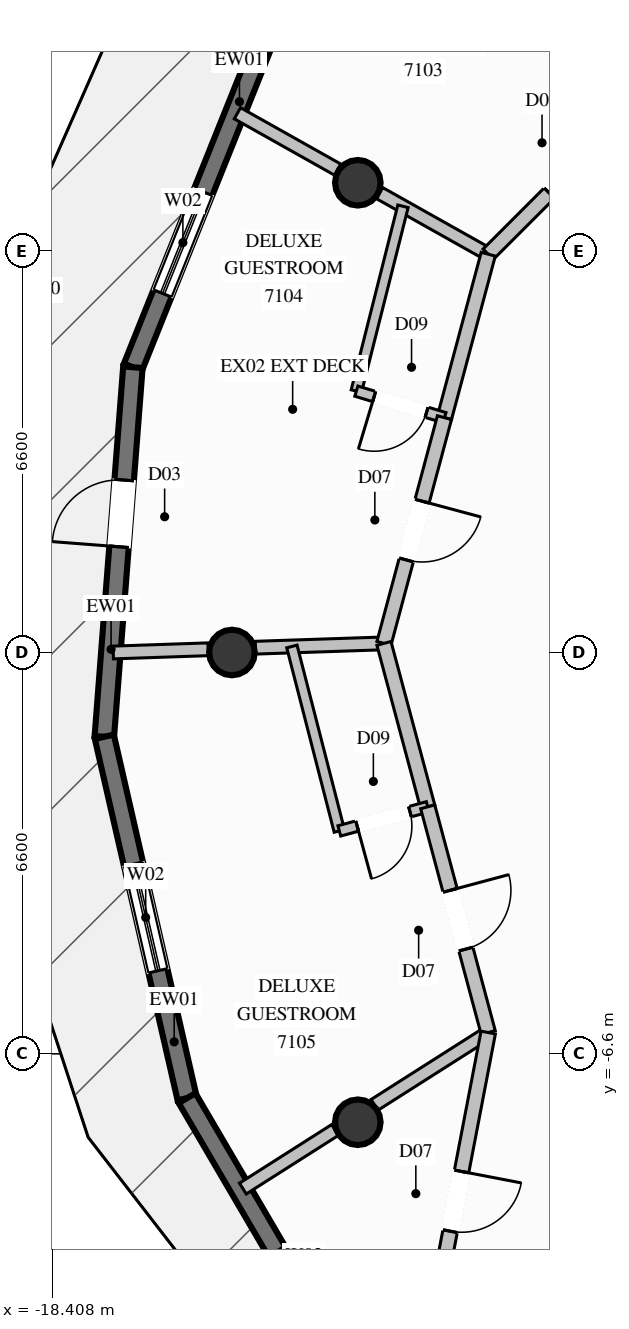
"""IFC4 building model, lengths in metres.
Left out: names, types, materials, properties, quantities, classifications, styles, units other than length and angle.
Written with IfcOpenShell. Run it as: python <this file> out.ifc"""

import sys

from ifc_helpers import new_model, si_unit, direction, frame, frame_2d, origin, origin_2d, place, context, subcontext, project, spatial, rectangle, circle, extrude, element, fill, save


model = new_model("IFC4")
c1 = context("Model", 3, precision=1e-05, world=origin(), true_north=direction((0.0, 1.0)))
c2 = subcontext(c1, "Body", "Model", "MODEL_VIEW")
j1 = project(units=[si_unit("LENGTHUNIT", "METRE"), si_unit("PLANEANGLEUNIT", "RADIAN")], contexts=[c1])
p1 = place(None, origin())
s1 = spatial("IfcSite", under=j1, at=p1, CompositionType="ELEMENT")
p2 = place(p1, origin())
s2 = spatial("IfcBuilding", under=s1, at=p2, CompositionType="ELEMENT")
p3 = place(p2, frame((0.0, 0.0, 266.8)))
s3 = spatial("IfcBuildingStorey", under=s2, at=p3, CompositionType="ELEMENT", Elevation=266.8)
for number, where, z_axis, x_axis in (
    (1, (-13.38, 7.725, 0.0), (0.0, 0.0, 1.0), (1.0, 0.0, 0.0)),
    (2, (-15.45, 0.0, 0.0), (0.0, 0.0, 1.0), (1.0, 0.0, 0.0)),
    (3, (-13.38, -7.725, 0.0), (0.0, 0.0, 1.0), (1.0, 0.0, 0.0)),
):
    element("IfcColumn", number, at=place(p3, frame(where, z_axis=z_axis, x_axis=x_axis)), inside=s3, PredefinedType="COLUMN", context=c2, shape_type="SweptSolid", body=[
        extrude(circle(Radius=0.375, at=origin_2d()), origin(), (0.0, 0.0, 1.0), 3.8),
    ])
p4 = place(p3, frame((-17.079, 4.691, 0.0), z_axis=(0.0, 0.0, 1.0), x_axis=(0.372370916096, 0.928083994499, 0.0)))
e4 = element("IfcWall", 4, at=p4, inside=s3, PredefinedType="SOLIDWALL", context=c2, shape_type="SweptSolid", body=[
    extrude(rectangle(XDim=6.053, YDim=0.32, at=frame_2d((3.027, 0.0))), origin(), (0.0, 0.0, 1.0), 3.57),
])
p5 = place(p4, frame((1.308, 0.0, 0.35)))
e5 = element("IfcOpeningElement", 5, at=p5, cuts=e4, PredefinedType="OPENING", context=c2, shape_type="SweptSolid", body=[
    extrude(rectangle(XDim=1.8, YDim=2.6, at=frame_2d((0.9, 1.3))), frame((0.0, 0.17, 0.0), z_axis=(0.0, -1.0, 0.0), x_axis=(1.0, 0.0, 0.0)), (0.0, 0.0, 1.0), 0.34),
])
p6 = place(p3, frame((-17.549, -1.386, 0.0), z_axis=(0.0, 0.0, 1.0), x_axis=(0.077106944018, 0.997022827815, 0.0)))
e6 = element("IfcWall", 6, at=p6, inside=s3, PredefinedType="SOLIDWALL", context=c2, shape_type="SweptSolid", body=[
    extrude(rectangle(XDim=6.095, YDim=0.32, at=frame_2d((3.047, 0.0))), origin(), (0.0, 0.0, 1.0), 3.57),
])
p7 = place(p6, frame((3.134, 0.0, 0.0)))
e7 = element("IfcOpeningElement", 7, at=p7, cuts=e6, PredefinedType="OPENING", context=c2, shape_type="SweptSolid", body=[
    extrude(rectangle(XDim=1.1, YDim=2.2, at=frame_2d((0.55, 1.1))), frame((0.0, 0.17, 0.0), z_axis=(0.0, -1.0, 0.0), x_axis=(1.0, 0.0, 0.0)), (0.0, 0.0, 1.0), 0.34),
])
p8 = place(p3, frame((-16.188, -7.328, 0.0), z_axis=(0.0, 0.0, 1.0), x_axis=(-0.223282610096, 0.974753751482, 0.0)))
e8 = element("IfcWall", 8, at=p8, inside=s3, PredefinedType="SOLIDWALL", context=c2, shape_type="SweptSolid", body=[
    extrude(rectangle(XDim=6.096, YDim=0.32, at=frame_2d((3.048, 0.0))), origin(), (0.0, 0.0, 1.0), 3.57),
])
p9 = place(p8, frame((2.148, 0.0, 0.35)))
e9 = element("IfcOpeningElement", 9, at=p9, cuts=e8, PredefinedType="OPENING", context=c2, shape_type="SweptSolid", body=[
    extrude(rectangle(XDim=1.8, YDim=2.6, at=frame_2d((0.9, 1.3))), frame((0.0, 0.17, 0.0), z_axis=(0.0, -1.0, 0.0), x_axis=(1.0, 0.0, 0.0)), (0.0, 0.0, 1.0), 0.34),
])
p10 = place(p3, frame((-13.13, -12.552, 0.0), z_axis=(0.0, 0.0, 1.0), x_axis=(-0.505189458577, 0.863008465163, 0.0)))
e10 = element("IfcWall", 10, at=p10, inside=s3, PredefinedType="SOLIDWALL", context=c2, shape_type="SweptSolid", body=[
    extrude(rectangle(XDim=6.053, YDim=0.32, at=frame_2d((3.027, 0.0))), origin(), (0.0, 0.0, 1.0), 3.57),
])
p11 = place(p10, frame((1.34, 0.0, 0.35)))
e11 = element("IfcOpeningElement", 11, at=p11, cuts=e10, PredefinedType="OPENING", context=c2, shape_type="SweptSolid", body=[
    extrude(rectangle(XDim=1.8, YDim=2.6, at=frame_2d((0.9, 1.3))), frame((0.0, 0.17, 0.0), z_axis=(0.0, -1.0, 0.0), x_axis=(1.0, 0.0, 0.0)), (0.0, 0.0, 1.0), 0.34),
])
p12 = place(p3, frame((-11.235, 6.55, 0.0), z_axis=(0.0, 0.0, 1.0), x_axis=(-0.871737625494, 0.489972970987, 0.0)))
e12 = element("IfcWall", 12, at=p12, inside=s3, PredefinedType="PARTITIONING", context=c2, shape_type="SweptSolid", body=[
    extrude(rectangle(XDim=2.051, YDim=0.21, at=frame_2d((1.025, 0.0))), origin(), (0.0, 0.0, 1.0), 3.085),
])
p13 = place(p3, frame((-13.711, 7.941, 0.0), z_axis=(0.0, 0.0, 1.0), x_axis=(-0.87172369265, 0.489997758844, 0.0)))
e13 = element("IfcWall", 13, at=p13, inside=s3, PredefinedType="PARTITIONING", context=c2, shape_type="SweptSolid", body=[
    extrude(rectangle(XDim=1.892, YDim=0.21, at=frame_2d((0.946, 0.0))), origin(), (0.0, 0.0, 1.0), 3.57),
])
p14 = place(p3, frame((-12.95, 0.15, 0.0), z_axis=(0.0, 0.0, 1.0), x_axis=(-0.999439124644, -0.033487850508, 0.0)))
e14 = element("IfcWall", 14, at=p14, inside=s3, PredefinedType="PARTITIONING", context=c2, shape_type="SweptSolid", body=[
    extrude(rectangle(XDim=2.114, YDim=0.21, at=frame_2d((1.057, 0.0))), origin(), (0.0, 0.0, 1.0), 3.57),
])
p15 = place(p3, frame((-15.841, 0.053, 0.0), z_axis=(0.0, 0.0, 1.0), x_axis=(-0.999424600814, -0.033918539002, 0.0)))
e15 = element("IfcWall", 15, at=p15, inside=s3, PredefinedType="PARTITIONING", context=c2, shape_type="SweptSolid", body=[
    extrude(rectangle(XDim=1.562, YDim=0.21, at=frame_2d((0.781, 0.0))), origin(), (0.0, 0.0, 1.0), 3.57),
])
p16 = place(p3, frame((-11.235, -6.25, 0.0), z_axis=(0.0, 0.0, 1.0), x_axis=(-0.843783883801, -0.536683107092, 0.0)))
e16 = element("IfcWall", 16, at=p16, inside=s3, PredefinedType="PARTITIONING", context=c2, shape_type="SweptSolid", body=[
    extrude(rectangle(XDim=2.217, YDim=0.21, at=frame_2d((1.109, 0.0))), origin(), (0.0, 0.0, 1.0), 3.085),
])
p17 = place(p3, frame((-13.754, -7.852, 0.0), z_axis=(0.0, 0.0, 1.0), x_axis=(-0.843896422102, -0.536506131152, 0.0)))
e17 = element("IfcWall", 17, at=p17, inside=s3, PredefinedType="PARTITIONING", context=c2, shape_type="SweptSolid", body=[
    extrude(rectangle(XDim=1.797, YDim=0.21, at=frame_2d((0.898, 0.0))), origin(), (0.0, 0.0, 1.0), 3.57),
])
p18 = place(p3, frame((-8.518, 9.267, 0.0), z_axis=(0.0, 0.0, 1.0), x_axis=(-0.707106781187, -0.707106781187, 0.0)))
e18 = element("IfcWall", 18, at=p18, inside=s3, PredefinedType="PARTITIONING", context=c2, shape_type="SweptSolid", body=[
    extrude(rectangle(XDim=3.843, YDim=0.24, at=frame_2d((1.921, 0.0))), origin(), (0.0, 0.0, 1.0), 3.57),
])
p19 = place(p18, frame((1.421, 0.0, 0.0)))
e19 = element("IfcOpeningElement", 19, at=p19, cuts=e18, PredefinedType="OPENING", context=c2, shape_type="SweptSolid", body=[
    extrude(rectangle(XDim=1.0, YDim=2.2, at=frame_2d((0.5, 1.1))), frame((0.0, 0.13, 0.0), z_axis=(0.0, -1.0, 0.0), x_axis=(1.0, 0.0, 0.0)), (0.0, 0.0, 1.0), 0.26),
])
p20 = place(p3, frame((-11.235, 6.55, 0.0), z_axis=(0.0, 0.0, 1.0), x_axis=(-0.258727314432, -0.96595040078, 0.0)))
e20 = element("IfcWall", 20, at=p20, inside=s3, PredefinedType="PARTITIONING", context=c2, shape_type="SweptSolid", body=[
    extrude(rectangle(XDim=2.783, YDim=0.24, at=frame_2d((1.391, 0.0))), origin(), (0.0, 0.0, 1.0), 3.57),
])
p21 = place(p3, frame((-12.637, 7.338, 0.0), z_axis=(0.0, 0.0, 1.0), x_axis=(-0.244678847227, -0.969604177858, 0.0)))
e21 = element("IfcWall", 21, at=p21, inside=s3, PredefinedType="PLUMBINGWALL", context=c2, shape_type="SweptSolid", body=[
    extrude(rectangle(XDim=3.135, YDim=0.175, at=frame_2d((1.567, 0.0))), origin(), (0.0, 0.0, 1.0), 3.57),
])
p22 = place(p3, frame((-11.955, 3.862, 0.0), z_axis=(0.0, 0.0, 1.0), x_axis=(-0.957581701608, 0.288161907173, 0.0)))
e22 = element("IfcWall", 22, at=p22, inside=s3, PredefinedType="PLUMBINGWALL", context=c2, shape_type="SweptSolid", body=[
    extrude(rectangle(XDim=1.513, YDim=0.175, at=frame_2d((0.757, 0.0))), origin(), (0.0, 0.0, 1.0), 3.57),
])
p23 = place(p22, frame((0.307, 0.0, 0.0)))
e23 = element("IfcOpeningElement", 23, at=p23, cuts=e22, PredefinedType="OPENING", context=c2, shape_type="SweptSolid", body=[
    extrude(rectangle(XDim=0.9, YDim=2.1, at=frame_2d((0.45, 1.05))), frame((0.0, 0.098, 0.0), z_axis=(0.0, -1.0, 0.0), x_axis=(1.0, 0.0, 0.0)), (0.0, 0.0, 1.0), 0.195),
])
p24 = place(p3, frame((-11.955, 3.862, 0.0), z_axis=(0.0, 0.0, 1.0), x_axis=(-0.258868389222, -0.965912603221, 0.0)))
e24 = element("IfcWall", 24, at=p24, inside=s3, PredefinedType="PARTITIONING", context=c2, shape_type="SweptSolid", body=[
    extrude(rectangle(XDim=3.843, YDim=0.24, at=frame_2d((1.922, 0.0))), origin(), (0.0, 0.0, 1.0), 3.57),
])
p25 = place(p24, frame((1.422, 0.0, 0.0)))
e25 = element("IfcOpeningElement", 25, at=p25, cuts=e24, PredefinedType="OPENING", context=c2, shape_type="SweptSolid", body=[
    extrude(rectangle(XDim=1.0, YDim=2.2, at=frame_2d((0.5, 1.1))), frame((0.0, 0.13, 0.0), z_axis=(0.0, -1.0, 0.0), x_axis=(1.0, 0.0, 0.0)), (0.0, 0.0, 1.0), 0.26),
])
p26 = place(p3, frame((-12.95, 0.15, 0.0), z_axis=(0.0, 0.0, 1.0), x_axis=(0.258727314432, -0.96595040078, 0.0)))
e26 = element("IfcWall", 26, at=p26, inside=s3, PredefinedType="PARTITIONING", context=c2, shape_type="SweptSolid", body=[
    extrude(rectangle(XDim=2.783, YDim=0.24, at=frame_2d((1.391, 0.0))), origin(), (0.0, 0.0, 1.0), 3.57),
])
p27 = place(p3, frame((-14.464, 0.099, 0.0), z_axis=(0.0, 0.0, 1.0), x_axis=(0.249059841598, -0.968488097657, 0.0)))
e27 = element("IfcWall", 27, at=p27, inside=s3, PredefinedType="PLUMBINGWALL", context=c2, shape_type="SweptSolid", body=[
    extrude(rectangle(XDim=3.132, YDim=0.175, at=frame_2d((1.566, 0.0))), origin(), (0.0, 0.0, 1.0), 3.57),
])
p28 = place(p3, frame((-12.23, -2.538, 0.0), z_axis=(0.0, 0.0, 1.0), x_axis=(-0.964860954296, -0.262760991919, 0.0)))
e28 = element("IfcWall", 28, at=p28, inside=s3, PredefinedType="PLUMBINGWALL", context=c2, shape_type="SweptSolid", body=[
    extrude(rectangle(XDim=1.507, YDim=0.175, at=frame_2d((0.753, 0.0))), origin(), (0.0, 0.0, 1.0), 3.57),
])
p29 = place(p28, frame((0.303, 0.0, 0.0)))
e29 = element("IfcOpeningElement", 29, at=p29, cuts=e28, PredefinedType="OPENING", context=c2, shape_type="SweptSolid", body=[
    extrude(rectangle(XDim=0.9, YDim=2.1, at=frame_2d((0.45, 1.05))), frame((0.0, 0.098, 0.0), z_axis=(0.0, -1.0, 0.0), x_axis=(1.0, 0.0, 0.0)), (0.0, 0.0, 1.0), 0.195),
])
p30 = place(p3, frame((-12.23, -2.538, 0.0), z_axis=(0.0, 0.0, 1.0), x_axis=(0.258884274469, -0.965908345772, 0.0)))
e30 = element("IfcWall", 30, at=p30, inside=s3, PredefinedType="PARTITIONING", context=c2, shape_type="SweptSolid", body=[
    extrude(rectangle(XDim=3.843, YDim=0.24, at=frame_2d((1.921, 0.0))), origin(), (0.0, 0.0, 1.0), 3.57),
])
p31 = place(p30, frame((1.422, 0.0, 0.0)))
e31 = element("IfcOpeningElement", 31, at=p31, cuts=e30, PredefinedType="OPENING", context=c2, shape_type="SweptSolid", body=[
    extrude(rectangle(XDim=1.0, YDim=2.2, at=frame_2d((0.5, 1.1))), frame((0.0, 0.13, 0.0), z_axis=(0.0, -1.0, 0.0), x_axis=(1.0, 0.0, 0.0)), (0.0, 0.0, 1.0), 0.26),
])
p32 = place(p3, frame((-11.235, -6.25, 0.0), z_axis=(0.0, 0.0, 1.0), x_axis=(-0.18844199237, -0.982084321997, 0.0)))
e32 = element("IfcWall", 32, at=p32, inside=s3, PredefinedType="PARTITIONING", context=c2, shape_type="SweptSolid", body=[
    extrude(rectangle(XDim=5.651, YDim=0.24, at=frame_2d((2.826, 0.0))), origin(), (0.0, 0.0, 1.0), 3.57),
])
p33 = place(p32, frame((2.326, 0.0, 0.0)))
e33 = element("IfcOpeningElement", 33, at=p33, cuts=e32, PredefinedType="OPENING", context=c2, shape_type="SweptSolid", body=[
    extrude(rectangle(XDim=1.0, YDim=2.2, at=frame_2d((0.5, 1.1))), frame((0.0, 0.13, 0.0), z_axis=(0.0, -1.0, 0.0), x_axis=(1.0, 0.0, 0.0)), (0.0, 0.0, 1.0), 0.26),
])
p34 = place(p5, origin())
e34 = element("IfcWindow", 34, at=p34, inside=s3, PartitioningType="SINGLE_PANEL", PredefinedType="WINDOW", context=c2, shape_type="SweptSolid", body=[
    extrude(rectangle(XDim=1.8, YDim=2.6, at=frame_2d((0.9, 1.3))), frame((0.0, 0.03, 0.0), z_axis=(0.0, -1.0, 0.0), x_axis=(1.0, 0.0, 0.0)), (0.0, 0.0, 1.0), 0.06),
])
fill(e5, e34)
p35 = place(p7, origin())
e35 = element("IfcDoor", 35, at=p35, inside=s3, OperationType="SINGLE_SWING_LEFT", PredefinedType="DOOR", context=c2, shape_type="SweptSolid", body=[
    extrude(rectangle(XDim=1.1, YDim=2.2, at=frame_2d((0.55, 1.1))), frame((0.0, 0.025, 0.0), z_axis=(0.0, -1.0, 0.0), x_axis=(1.0, 0.0, 0.0)), (0.0, 0.0, 1.0), 0.05),
])
fill(e7, e35)
p36 = place(p9, origin())
e36 = element("IfcWindow", 36, at=p36, inside=s3, PartitioningType="SINGLE_PANEL", PredefinedType="WINDOW", context=c2, shape_type="SweptSolid", body=[
    extrude(rectangle(XDim=1.8, YDim=2.6, at=frame_2d((0.9, 1.3))), frame((0.0, 0.03, 0.0), z_axis=(0.0, -1.0, 0.0), x_axis=(1.0, 0.0, 0.0)), (0.0, 0.0, 1.0), 0.06),
])
fill(e9, e36)
p37 = place(p19, origin())
e37 = element("IfcDoor", 37, at=p37, inside=s3, OperationType="SINGLE_SWING_LEFT", PredefinedType="DOOR", context=c2, shape_type="SweptSolid", body=[
    extrude(rectangle(XDim=1.0, YDim=2.2, at=frame_2d((0.5, 1.1))), frame((0.0, 0.025, 0.0), z_axis=(0.0, -1.0, 0.0), x_axis=(1.0, 0.0, 0.0)), (0.0, 0.0, 1.0), 0.05),
])
fill(e19, e37)
p38 = place(p23, origin())
e38 = element("IfcDoor", 38, at=p38, inside=s3, OperationType="SINGLE_SWING_RIGHT", PredefinedType="DOOR", context=c2, shape_type="SweptSolid", body=[
    extrude(rectangle(XDim=0.9, YDim=2.1, at=frame_2d((0.45, 1.05))), frame((0.0, 0.025, 0.0), z_axis=(0.0, -1.0, 0.0), x_axis=(1.0, 0.0, 0.0)), (0.0, 0.0, 1.0), 0.05),
])
fill(e23, e38)
p39 = place(p25, origin())
e39 = element("IfcDoor", 39, at=p39, inside=s3, OperationType="SINGLE_SWING_LEFT", PredefinedType="DOOR", context=c2, shape_type="SweptSolid", body=[
    extrude(rectangle(XDim=1.0, YDim=2.2, at=frame_2d((0.5, 1.1))), frame((0.0, 0.025, 0.0), z_axis=(0.0, -1.0, 0.0), x_axis=(1.0, 0.0, 0.0)), (0.0, 0.0, 1.0), 0.05),
])
fill(e25, e39)
p40 = place(p29, origin())
e40 = element("IfcDoor", 40, at=p40, inside=s3, OperationType="SINGLE_SWING_RIGHT", PredefinedType="DOOR", context=c2, shape_type="SweptSolid", body=[
    extrude(rectangle(XDim=0.9, YDim=2.1, at=frame_2d((0.45, 1.05))), frame((0.0, 0.025, 0.0), z_axis=(0.0, -1.0, 0.0), x_axis=(1.0, 0.0, 0.0)), (0.0, 0.0, 1.0), 0.05),
])
fill(e29, e40)
p41 = place(p31, origin())
e41 = element("IfcDoor", 41, at=p41, inside=s3, OperationType="SINGLE_SWING_LEFT", PredefinedType="DOOR", context=c2, shape_type="SweptSolid", body=[
    extrude(rectangle(XDim=1.0, YDim=2.2, at=frame_2d((0.5, 1.1))), frame((0.0, 0.025, 0.0), z_axis=(0.0, -1.0, 0.0), x_axis=(1.0, 0.0, 0.0)), (0.0, 0.0, 1.0), 0.05),
])
fill(e31, e41)
p42 = place(p33, origin())
e42 = element("IfcDoor", 42, at=p42, inside=s3, OperationType="SINGLE_SWING_LEFT", PredefinedType="DOOR", context=c2, shape_type="SweptSolid", body=[
    extrude(rectangle(XDim=1.0, YDim=2.2, at=frame_2d((0.5, 1.1))), frame((0.0, 0.025, 0.0), z_axis=(0.0, -1.0, 0.0), x_axis=(1.0, 0.0, 0.0)), (0.0, 0.0, 1.0), 0.05),
])
fill(e33, e42)
save(model, sys.argv[1])
